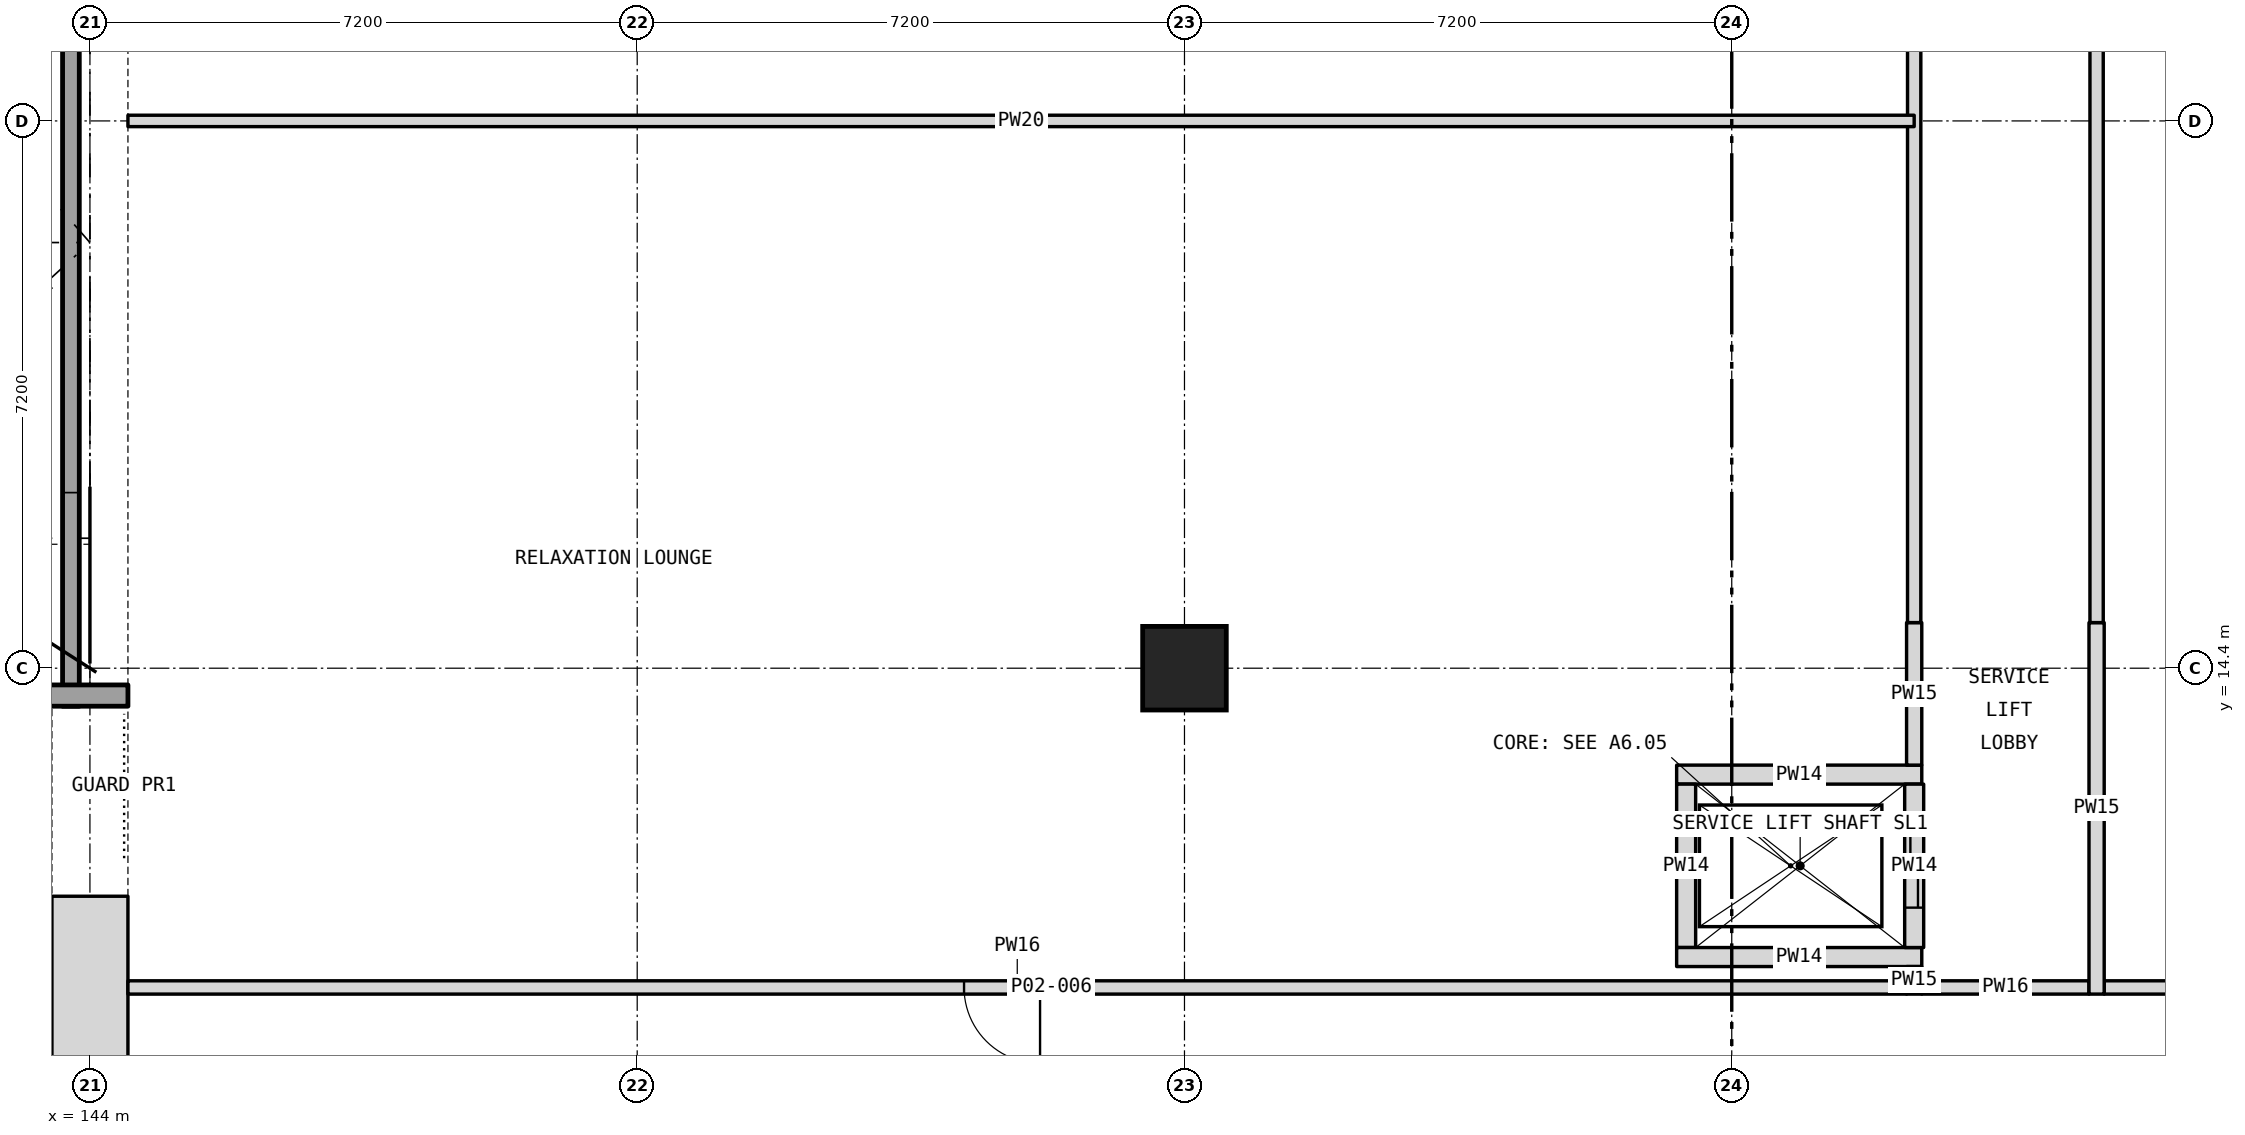
"""IFC4 building model, lengths in metres.
Left out: names, types, materials, properties, quantities, classifications, styles, units other than length and angle.
Written with IfcOpenShell. Run it as: python <this file> out.ifc"""

import sys

from ifc_helpers import new_model, si_unit, direction, frame, frame_2d, origin, origin_2d, place, context, subcontext, project, spatial, polyline, rectangle, outline, extrude, element, fill, save


model = new_model("IFC4")
c1 = context("Model", 3, precision=1e-05, world=origin(), true_north=direction((0.0, 1.0)))
c2 = subcontext(c1, "Body", "Model", "MODEL_VIEW")
j1 = project(units=[si_unit("LENGTHUNIT", "METRE"), si_unit("PLANEANGLEUNIT", "RADIAN")], contexts=[c1])
p1 = place(None, origin())
s1 = spatial("IfcSite", under=j1, at=p1, CompositionType="ELEMENT")
p2 = place(p1, origin())
s2 = spatial("IfcBuilding", under=s1, at=p2, CompositionType="ELEMENT")
p3 = place(p2, frame((0.0, 0.0, 12.0)))
s3 = spatial("IfcBuildingStorey", under=s2, at=p3, CompositionType="ELEMENT", Elevation=12.0)
p4 = place(p3, frame((143.75, 13.9, 0.0), z_axis=(0.0, 0.0, 1.0), x_axis=(0.0, 1.0, 0.0)))
e1 = element("IfcWall", 1, at=p4, inside=s3, PredefinedType="SOLIDWALL", context=c2, shape_type="SweptSolid", body=[
    extrude(outline(polyline([(0.0, 0.0), (24.4, 0.0), (24.4, 17.763), (20.23, 17.33), (20.23, 17.314), (15.0, 15.639), (15.0, 15.604), (10.22, 12.888), (10.22, 12.823), (6.1, 9.185), (6.1, 8.899), (2.81, 4.486), (2.81, 4.167), (0.917, 0.08), (0.0, 0.08), (0.0, 0.0)])), frame((0.0, 0.11, 0.0), z_axis=(0.0, -1.0, 0.0), x_axis=(1.0, 0.0, 0.0)), (0.0, 0.0, 1.0), 0.22),
])
p5 = place(p3, frame((136.8, 14.04, 0.0), z_axis=(0.0, 0.0, 1.0), x_axis=(1.0, 0.0, 0.0)))
e2 = element("IfcWall", 2, at=p5, inside=s3, PredefinedType="PARAPET", context=c2, shape_type="SweptSolid", body=[
    extrude(rectangle(XDim=7.7, YDim=0.28, at=frame_2d((3.85, 0.0))), origin(), (0.0, 0.0, 1.0), 1.4),
])
p6 = place(p3, frame((158.4, 14.4, 0.0), z_axis=(0.0, 0.0, 1.0), x_axis=(1.0, 0.0, 0.0)))
e3 = element("IfcColumn", 3, at=p6, inside=s3, PredefinedType="COLUMN", context=c2, shape_type="SweptSolid", body=[
    extrude(rectangle(XDim=1.1, YDim=1.1, at=origin_2d()), origin(), (0.0, 0.0, 1.0), 4.5),
])
p7 = place(p3, frame((144.0, 0.4, 0.0), z_axis=(0.0, 0.0, 1.0), x_axis=(0.0, 1.0, 0.0)))
e4 = element("IfcWall", 4, at=p7, inside=s3, PredefinedType="SOLIDWALL", context=c2, shape_type="SweptSolid", body=[
    extrude(rectangle(XDim=11.0, YDim=1.0, at=frame_2d((5.5, 0.0))), origin(), (0.0, 0.0, 1.0), 4.0),
])
p8 = place(p3, frame((144.5, 10.2, 0.0), z_axis=(0.0, 0.0, 1.0), x_axis=(1.0, 0.0, 0.0)))
e5 = element("IfcWall", 5, at=p8, inside=s3, PredefinedType="PARTITIONING", context=c2, shape_type="SweptSolid", body=[
    extrude(rectangle(XDim=23.4, YDim=0.175, at=frame_2d((11.7, 0.0))), origin(), (0.0, 0.0, 1.0), 4.0),
])
p9 = place(p8, frame((11.0, 0.0, 0.0)))
e6 = element("IfcOpeningElement", 6, at=p9, cuts=e5, PredefinedType="OPENING", context=c2, shape_type="SweptSolid", body=[
    extrude(rectangle(XDim=1.0, YDim=2.1, at=frame_2d((0.5, 1.05))), frame((0.0, 0.097, 0.0), z_axis=(0.0, -1.0, 0.0), x_axis=(1.0, 0.0, 0.0)), (0.0, 0.0, 1.0), 0.195),
])
p10 = place(p3, frame((168.1, 10.2, 0.0), z_axis=(0.0, 0.0, 1.0), x_axis=(1.0, 0.0, 0.0)))
e7 = element("IfcWall", 7, at=p10, inside=s3, PredefinedType="PARTITIONING", context=c2, shape_type="SweptSolid", body=[
    extrude(rectangle(XDim=2.2, YDim=0.175, at=frame_2d((1.1, 0.0))), origin(), (0.0, 0.0, 1.0), 4.0),
])
p11 = place(p3, frame((170.5, 10.2, 0.0), z_axis=(0.0, 0.0, 1.0), x_axis=(1.0, 0.0, 0.0)))
e8 = element("IfcWall", 8, at=p11, inside=s3, PredefinedType="PARTITIONING", context=c2, shape_type="SweptSolid", body=[
    extrude(rectangle(XDim=23.75, YDim=0.175, at=frame_2d((11.875, 0.0))), origin(), (0.0, 0.0, 1.0), 4.0),
])
p12 = place(p3, frame((164.875, 13.0, 0.0), z_axis=(0.0, 0.0, 1.0), x_axis=(1.0, 0.0, 0.0)))
e9 = element("IfcWall", 9, at=p12, inside=s3, PredefinedType="SOLIDWALL", context=c2, shape_type="SweptSolid", body=[
    extrude(rectangle(XDim=3.225, YDim=0.25, at=frame_2d((1.613, 0.0))), origin(), (0.0, 0.0, 1.0), 4.0),
])
p13 = place(p3, frame((165.0, 10.725, 0.0), z_axis=(0.0, 0.0, 1.0), x_axis=(0.0, 1.0, 0.0)))
e10 = element("IfcWall", 10, at=p13, inside=s3, PredefinedType="SOLIDWALL", context=c2, shape_type="SweptSolid", body=[
    extrude(rectangle(XDim=2.15, YDim=0.25, at=frame_2d((1.075, 0.0))), origin(), (0.0, 0.0, 1.0), 4.0),
])
p14 = place(p3, frame((164.875, 10.6, 0.0), z_axis=(0.0, 0.0, 1.0), x_axis=(1.0, 0.0, 0.0)))
e11 = element("IfcWall", 11, at=p14, inside=s3, PredefinedType="SOLIDWALL", context=c2, shape_type="SweptSolid", body=[
    extrude(rectangle(XDim=3.225, YDim=0.25, at=frame_2d((1.613, 0.0))), origin(), (0.0, 0.0, 1.0), 4.0),
])
p15 = place(p3, frame((168.0, 10.113, 0.0), z_axis=(0.0, 0.0, 1.0), x_axis=(0.0, 1.0, 0.0)))
e12 = element("IfcWall", 12, at=p15, inside=s3, PredefinedType="PARTITIONING", context=c2, shape_type="SweptSolid", body=[
    extrude(rectangle(XDim=0.363, YDim=0.2, at=frame_2d((0.181, 0.0))), origin(), (0.0, 0.0, 1.0), 4.0),
])
p16 = place(p3, frame((168.0, 10.725, 0.0), z_axis=(0.0, 0.0, 1.0), x_axis=(0.0, 1.0, 0.0)))
e13 = element("IfcWall", 13, at=p16, inside=s3, PredefinedType="SOLIDWALL", context=c2, shape_type="SweptSolid", body=[
    extrude(rectangle(XDim=2.15, YDim=0.25, at=frame_2d((1.075, 0.0))), origin(), (0.0, 0.0, 1.0), 4.0),
])
p17 = place(p16, frame((0.525, 0.0, 0.0)))
e14 = element("IfcOpeningElement", 14, at=p17, cuts=e13, PredefinedType="OPENING", context=c2, shape_type="SweptSolid", body=[
    extrude(rectangle(XDim=1.1, YDim=2.1, at=frame_2d((0.55, 1.05))), frame((0.0, 0.135, 0.0), z_axis=(0.0, -1.0, 0.0), x_axis=(1.0, 0.0, 0.0)), (0.0, 0.0, 1.0), 0.27),
])
p18 = place(p3, frame((168.0, 13.125, 0.0), z_axis=(0.0, 0.0, 1.0), x_axis=(0.0, 1.0, 0.0)))
e15 = element("IfcWall", 15, at=p18, inside=s3, PredefinedType="PARTITIONING", context=c2, shape_type="SweptSolid", body=[
    extrude(rectangle(XDim=1.875, YDim=0.2, at=frame_2d((0.938, 0.0))), origin(), (0.0, 0.0, 1.0), 4.0),
])
p19 = place(p3, frame((168.0, 15.0, 0.0), z_axis=(0.0, 0.0, 1.0), x_axis=(0.0, 1.0, 0.0)))
e16 = element("IfcWall", 16, at=p19, inside=s3, PredefinedType="PARTITIONING", context=c2, shape_type="SweptSolid", body=[
    extrude(rectangle(XDim=61.712, YDim=0.175, at=frame_2d((30.856, 0.0))), origin(), (0.0, 0.0, 1.0), 4.0),
])
p20 = place(p19, frame((12.799, 0.0, 0.0)))
e17 = element("IfcOpeningElement", 17, at=p20, cuts=e16, PredefinedType="OPENING", context=c2, shape_type="SweptSolid", body=[
    extrude(rectangle(XDim=1.8, YDim=2.1, at=frame_2d((0.9, 1.05))), frame((0.0, 0.097, 0.0), z_axis=(0.0, -1.0, 0.0), x_axis=(1.0, 0.0, 0.0)), (0.0, 0.0, 1.0), 0.195),
])
p21 = place(p19, frame((31.3, 0.0, 0.0)))
e18 = element("IfcOpeningElement", 18, at=p21, cuts=e16, PredefinedType="OPENING", context=c2, shape_type="SweptSolid", body=[
    extrude(rectangle(XDim=1.0, YDim=2.1, at=frame_2d((0.5, 1.05))), frame((0.0, 0.097, 0.0), z_axis=(0.0, -1.0, 0.0), x_axis=(1.0, 0.0, 0.0)), (0.0, 0.0, 1.0), 0.195),
])
p22 = place(p19, frame((51.599, 0.0, 0.0)))
e19 = element("IfcOpeningElement", 19, at=p22, cuts=e16, PredefinedType="OPENING", context=c2, shape_type="SweptSolid", body=[
    extrude(rectangle(XDim=1.0, YDim=2.1, at=frame_2d((0.5, 1.05))), frame((0.0, 0.097, 0.0), z_axis=(0.0, -1.0, 0.0), x_axis=(1.0, 0.0, 0.0)), (0.0, 0.0, 1.0), 0.195),
])
p23 = place(p3, frame((144.5, 21.6, 0.0), z_axis=(0.0, 0.0, 1.0), x_axis=(1.0, 0.0, 0.0)))
e20 = element("IfcWall", 20, at=p23, inside=s3, PredefinedType="PARTITIONING", context=c2, shape_type="SweptSolid", body=[
    extrude(rectangle(XDim=23.5, YDim=0.15, at=frame_2d((11.75, 0.0))), origin(), (0.0, 0.0, 1.0), 4.0),
])
p24 = place(p3, frame((170.4, 10.113, 0.0), z_axis=(0.0, 0.0, 1.0), x_axis=(0.0, 1.0, 0.0)))
e21 = element("IfcWall", 21, at=p24, inside=s3, PredefinedType="PARTITIONING", context=c2, shape_type="SweptSolid", body=[
    extrude(rectangle(XDim=4.887, YDim=0.2, at=frame_2d((2.444, 0.0))), origin(), (0.0, 0.0, 1.0), 4.0),
])
p25 = place(p3, frame((170.4, 15.0, 0.0), z_axis=(0.0, 0.0, 1.0), x_axis=(0.0, 1.0, 0.0)))
e22 = element("IfcWall", 22, at=p25, inside=s3, PredefinedType="PARTITIONING", context=c2, shape_type="SweptSolid", body=[
    extrude(rectangle(XDim=61.712, YDim=0.175, at=frame_2d((30.856, 0.0))), origin(), (0.0, 0.0, 1.0), 4.0),
])
p26 = place(p25, frame((8.9, 0.0, 0.0)))
e23 = element("IfcOpeningElement", 23, at=p26, cuts=e22, PredefinedType="OPENING", context=c2, shape_type="SweptSolid", body=[
    extrude(rectangle(XDim=1.0, YDim=2.1, at=frame_2d((0.5, 1.05))), frame((0.0, 0.097, 0.0), z_axis=(0.0, -1.0, 0.0), x_axis=(1.0, 0.0, 0.0)), (0.0, 0.0, 1.0), 0.195),
])
p27 = place(p25, frame((30.1, 0.0, 0.0)))
e24 = element("IfcOpeningElement", 24, at=p27, cuts=e22, PredefinedType="OPENING", context=c2, shape_type="SweptSolid", body=[
    extrude(rectangle(XDim=1.0, YDim=2.1, at=frame_2d((0.5, 1.05))), frame((0.0, 0.097, 0.0), z_axis=(0.0, -1.0, 0.0), x_axis=(1.0, 0.0, 0.0)), (0.0, 0.0, 1.0), 0.195),
])
p28 = place(p25, frame((51.751, 0.0, 0.0)))
e25 = element("IfcOpeningElement", 25, at=p28, cuts=e22, PredefinedType="OPENING", context=c2, shape_type="SweptSolid", body=[
    extrude(rectangle(XDim=1.1, YDim=2.4, at=frame_2d((0.55, 1.2))), frame((0.0, 0.097, 0.0), z_axis=(0.0, -1.0, 0.0), x_axis=(1.0, 0.0, 0.0)), (0.0, 0.0, 1.0), 0.195),
])
p29 = place(p9, frame((1.0, 0.0, 0.0), z_axis=(0.0, 0.0, 1.0), x_axis=(-1.0, 0.0, 0.0)))
e26 = element("IfcDoor", 26, at=p29, inside=s3, OperationType="SINGLE_SWING_LEFT", PredefinedType="DOOR", context=c2, shape_type="SweptSolid", body=[
    extrude(rectangle(XDim=1.0, YDim=2.1, at=frame_2d((0.5, 1.05))), frame((0.0, 0.025, 0.0), z_axis=(0.0, -1.0, 0.0), x_axis=(1.0, 0.0, 0.0)), (0.0, 0.0, 1.0), 0.05),
])
fill(e6, e26)
p30 = place(p17, origin())
e27 = element("IfcDoor", 27, at=p30, inside=s3, OperationType="DOUBLE_DOOR_SLIDING", PredefinedType="DOOR", context=c2, shape_type="SweptSolid", body=[
    extrude(rectangle(XDim=1.1, YDim=2.1, at=frame_2d((0.55, 1.05))), frame((0.0, 0.025, 0.0), z_axis=(0.0, -1.0, 0.0), x_axis=(1.0, 0.0, 0.0)), (0.0, 0.0, 1.0), 0.05),
])
fill(e14, e27)
save(model, sys.argv[1])
